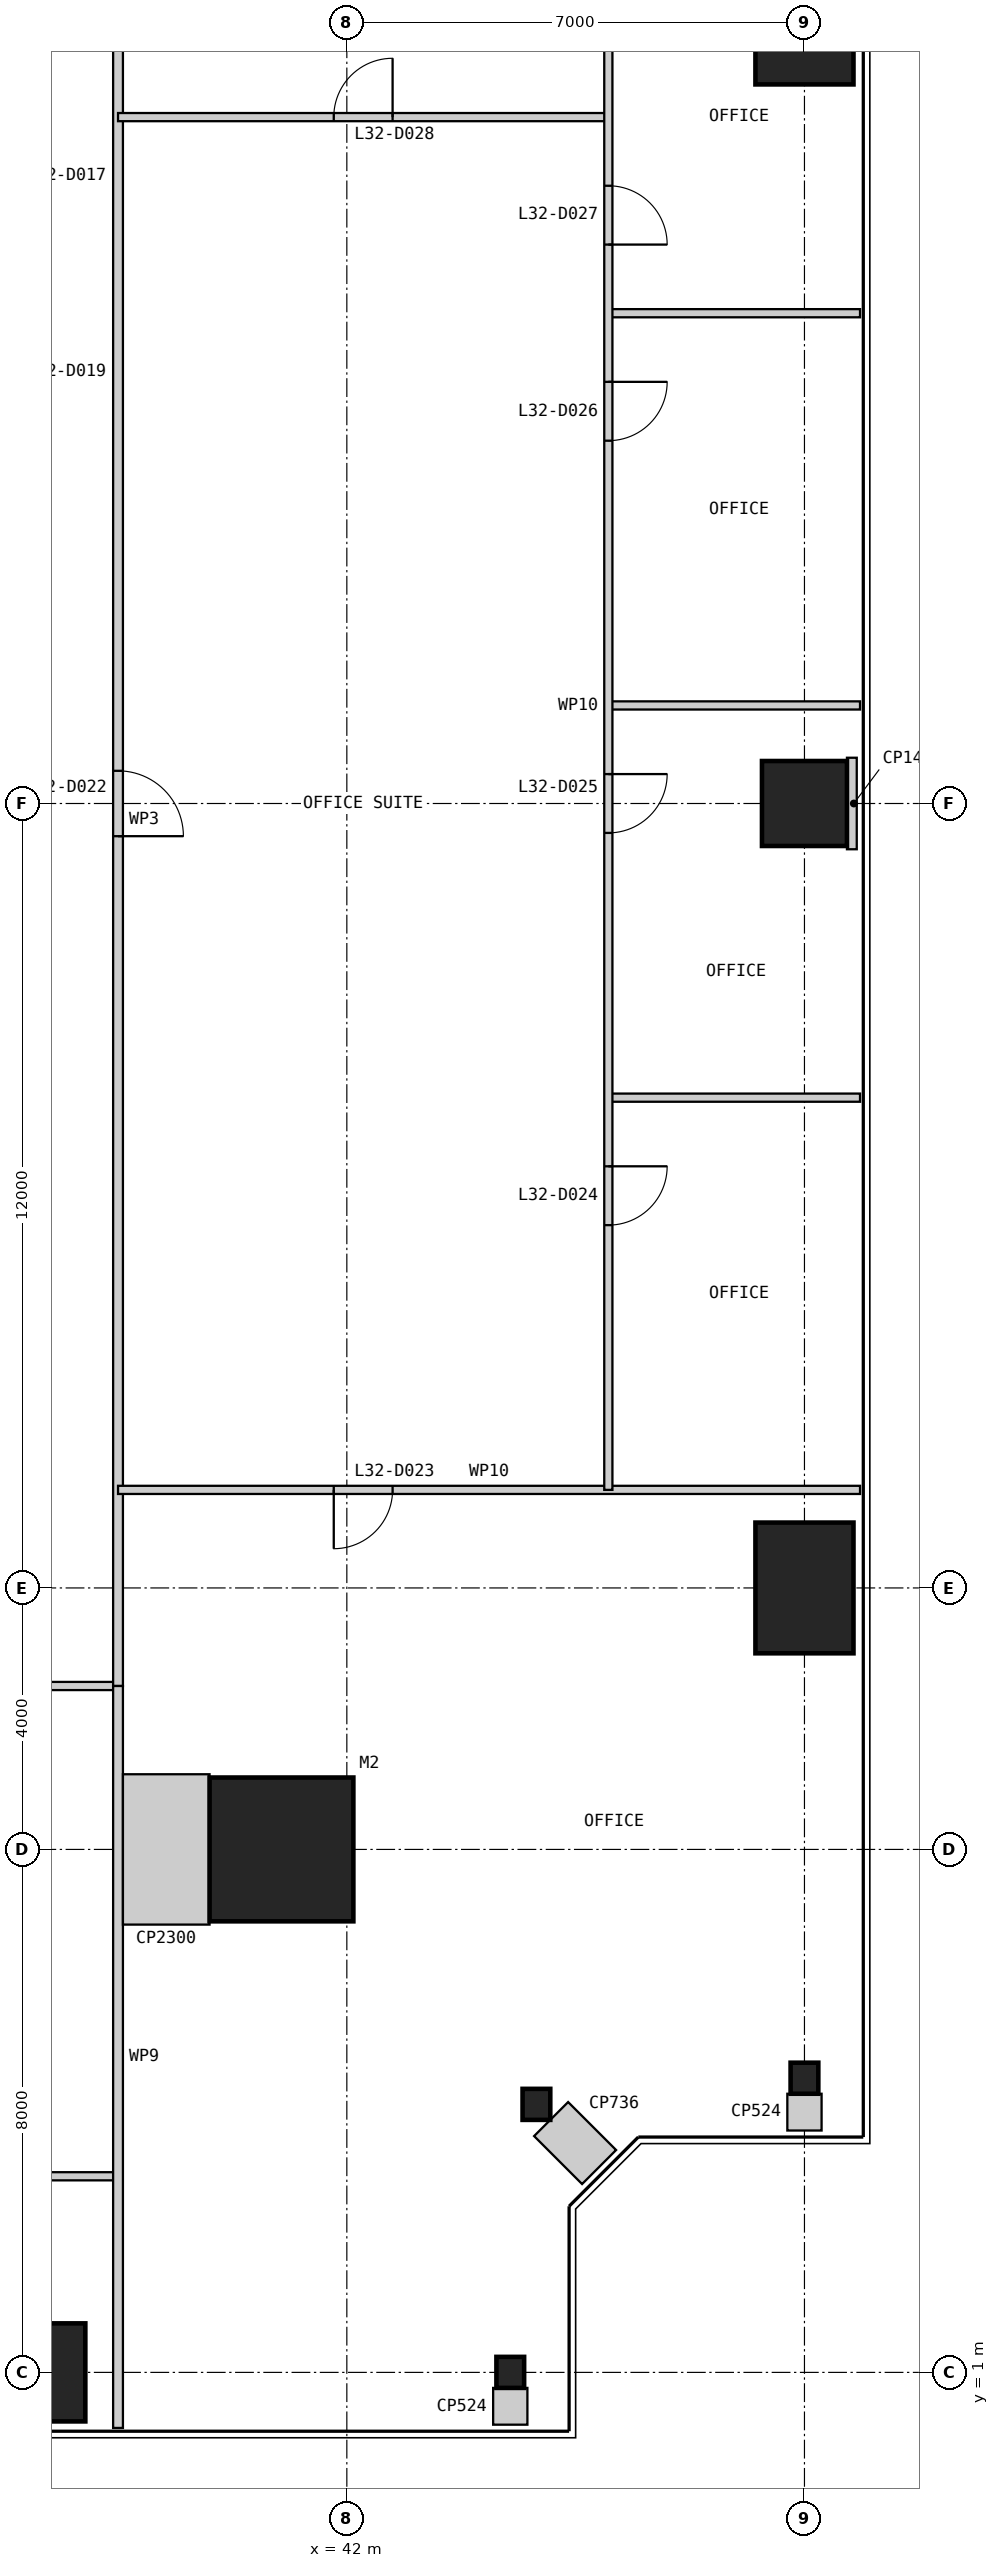
"""IFC4 building model, lengths in metres.
Left out: names, types, materials, properties, quantities, classifications, styles, units other than length and angle.
Written with IfcOpenShell. Run it as: python <this file> out.ifc"""

import sys

from ifc_helpers import new_model, si_unit, direction, frame, frame_2d, origin, origin_2d, place, context, subcontext, project, spatial, rectangle, i_section, extrude, element, fill, save


model = new_model("IFC4")
c1 = context("Model", 3, precision=1e-05, world=origin(), true_north=direction((0.0, 1.0)))
c2 = subcontext(c1, "Body", "Model", "MODEL_VIEW")
j1 = project(units=[si_unit("LENGTHUNIT", "METRE"), si_unit("PLANEANGLEUNIT", "RADIAN")], contexts=[c1])
p1 = place(None, origin())
s1 = spatial("IfcSite", under=j1, at=p1, CompositionType="ELEMENT")
p2 = place(p1, origin())
s2 = spatial("IfcBuilding", under=s1, at=p2, CompositionType="ELEMENT")
p3 = place(p2, frame((0.0, 0.0, 138.4)))
s3 = spatial("IfcBuildingStorey", under=s2, at=p3, CompositionType="ELEMENT", Elevation=138.4)
p4 = place(p3, frame((41.0, 9.0, 0.0), z_axis=(0.0, 0.0, 1.0), x_axis=(1.0, 0.0, 0.0)))
e1 = element("IfcColumn", 1, at=p4, inside=s3, PredefinedType="COLUMN", context=c2, shape_type="SweptSolid", body=[
    extrude(rectangle(XDim=2.2, YDim=2.2, at=origin_2d()), origin(), (0.0, 0.0, 1.0), 4.0),
])
p5 = place(p3, frame((37.0, 1.0, 0.0), z_axis=(0.0, 0.0, 1.0), x_axis=(1.0, 0.0, 0.0)))
e2 = element("IfcColumn", 2, at=p5, inside=s3, PredefinedType="COLUMN", context=c2, shape_type="SweptSolid", body=[
    extrude(rectangle(XDim=2.0, YDim=1.5, at=origin_2d()), origin(), (0.0, 0.0, 1.0), 4.0),
])
for number, where, z_axis, x_axis in (
    (3, (44.5, 1.0, 0.0), (0.0, 0.0, 1.0), (1.0, 0.0, 0.0)),
    (4, (44.9, 5.1, 0.0), (0.0, 0.0, 1.0), (1.0, 0.0, 0.0)),
    (5, (49.0, 5.5, 0.0), (0.0, 0.0, 1.0), (1.0, 0.0, 0.0)),
):
    element("IfcColumn", number, at=place(p3, frame(where, z_axis=z_axis, x_axis=x_axis)), inside=s3, PredefinedType="COLUMN", context=c2, shape_type="SweptSolid", body=[
        extrude(i_section(OverallWidth=0.424, OverallDepth=0.475, WebThickness=0.048, FlangeThickness=0.077, at=origin_2d()), origin(), (0.0, 0.0, 1.0), 4.0),
    ])
p6 = place(p3, frame((49.0, 13.0, 0.0), z_axis=(0.0, 0.0, 1.0), x_axis=(1.0, 0.0, 0.0)))
e6 = element("IfcColumn", 6, at=p6, inside=s3, PredefinedType="COLUMN", context=c2, shape_type="SweptSolid", body=[
    extrude(rectangle(XDim=1.5, YDim=2.0, at=origin_2d()), origin(), (0.0, 0.0, 1.0), 4.0),
])
p7 = place(p3, frame((49.0, 25.0, 0.0), z_axis=(0.0, 0.0, 1.0), x_axis=(1.0, 0.0, 0.0)))
e7 = element("IfcColumn", 7, at=p7, inside=s3, PredefinedType="COLUMN", context=c2, shape_type="SweptSolid", body=[
    extrude(rectangle(XDim=1.3, YDim=1.3, at=origin_2d()), origin(), (0.0, 0.0, 1.0), 4.0),
])
p8 = place(p3, frame((49.0, 37.0, 0.0), z_axis=(0.0, 0.0, 1.0), x_axis=(1.0, 0.0, 0.0)))
e8 = element("IfcColumn", 8, at=p8, inside=s3, PredefinedType="COLUMN", context=c2, shape_type="SweptSolid", body=[
    extrude(rectangle(XDim=1.5, YDim=2.0, at=origin_2d()), origin(), (0.0, 0.0, 1.0), 4.0),
])
p9 = place(p3, frame((32.5, 4.0, 0.0), z_axis=(0.0, 0.0, 1.0), x_axis=(1.0, 0.0, 0.0)))
e9 = element("IfcWall", 9, at=p9, inside=s3, PredefinedType="PARTITIONING", context=c2, shape_type="SweptSolid", body=[
    extrude(rectangle(XDim=6.0, YDim=0.125, at=frame_2d((3.0, 0.0))), origin(), (0.0, 0.0, 1.0), 3.85),
])
p10 = place(p3, frame((35.5, 11.5, 0.0), z_axis=(0.0, 0.0, 1.0), x_axis=(1.0, 0.0, 0.0)))
e10 = element("IfcWall", 10, at=p10, inside=s3, PredefinedType="PARTITIONING", context=c2, shape_type="SweptSolid", body=[
    extrude(rectangle(XDim=3.0, YDim=0.125, at=frame_2d((1.5, 0.0))), origin(), (0.0, 0.0, 1.0), 3.85),
])
p11 = place(p3, frame((38.5, 11.5, 0.0), z_axis=(0.0, 0.0, 1.0), x_axis=(0.0, 1.0, 0.0)))
e11 = element("IfcWall", 11, at=p11, inside=s3, PredefinedType="PARTITIONING", context=c2, shape_type="SweptSolid", body=[
    extrude(rectangle(XDim=27.0, YDim=0.15, at=frame_2d((13.5, 0.0))), origin(), (0.0, 0.0, 1.0), 3.85),
])
p12 = place(p11, frame((13.0, 0.0, 0.0)))
e12 = element("IfcOpeningElement", 12, at=p12, cuts=e11, PredefinedType="OPENING", context=c2, shape_type="SweptSolid", body=[
    extrude(rectangle(XDim=1.0, YDim=2.2, at=frame_2d((0.5, 1.1))), frame((0.0, 0.085, 0.0), z_axis=(0.0, -1.0, 0.0), x_axis=(1.0, 0.0, 0.0)), (0.0, 0.0, 1.0), 0.17),
])
p13 = place(p3, frame((38.5, 0.15, 0.0), z_axis=(0.0, 0.0, 1.0), x_axis=(0.0, 1.0, 0.0)))
e13 = element("IfcWall", 13, at=p13, inside=s3, PredefinedType="PARTITIONING", context=c2, shape_type="SweptSolid", body=[
    extrude(rectangle(XDim=11.35, YDim=0.15, at=frame_2d((5.675, 0.0))), origin(), (0.0, 0.0, 1.0), 3.85),
])
p14 = place(p3, frame((49.85, 14.5, 0.0), z_axis=(0.0, 0.0, 1.0), x_axis=(-1.0, 0.0, 0.0)))
e14 = element("IfcWall", 14, at=p14, inside=s3, PredefinedType="PARTITIONING", context=c2, shape_type="SweptSolid", body=[
    extrude(rectangle(XDim=11.35, YDim=0.125, at=frame_2d((5.675, 0.0))), origin(), (0.0, 0.0, 1.0), 3.85),
])
p15 = place(p14, frame((7.15, 0.0, 0.0)))
e15 = element("IfcOpeningElement", 15, at=p15, cuts=e14, PredefinedType="OPENING", context=c2, shape_type="SweptSolid", body=[
    extrude(rectangle(XDim=0.9, YDim=2.2, at=frame_2d((0.45, 1.1))), frame((0.0, 0.073, 0.0), z_axis=(0.0, -1.0, 0.0), x_axis=(1.0, 0.0, 0.0)), (0.0, 0.0, 1.0), 0.145),
])
for number, where, z_axis, x_axis in (
    (16, (49.85, 20.5, 0.0), (0.0, 0.0, 1.0), (-1.0, 0.0, 0.0)),
    (17, (49.85, 26.5, 0.0), (0.0, 0.0, 1.0), (-1.0, 0.0, 0.0)),
    (18, (49.85, 32.5, 0.0), (0.0, 0.0, 1.0), (-1.0, 0.0, 0.0)),
):
    element("IfcWall", number, at=place(p3, frame(where, z_axis=z_axis, x_axis=x_axis)), inside=s3, PredefinedType="PARTITIONING", context=c2, shape_type="SweptSolid", body=[
        extrude(rectangle(XDim=3.85, YDim=0.125, at=frame_2d((1.925, 0.0))), origin(), (0.0, 0.0, 1.0), 3.85),
    ])
p16 = place(p3, frame((46.0, 35.5, 0.0), z_axis=(0.0, 0.0, 1.0), x_axis=(-1.0, 0.0, 0.0)))
e19 = element("IfcWall", 19, at=p16, inside=s3, PredefinedType="PARTITIONING", context=c2, shape_type="SweptSolid", body=[
    extrude(rectangle(XDim=7.5, YDim=0.125, at=frame_2d((3.75, 0.0))), origin(), (0.0, 0.0, 1.0), 3.85),
])
p17 = place(p16, frame((3.3, 0.0, 0.0)))
e20 = element("IfcOpeningElement", 20, at=p17, cuts=e19, PredefinedType="OPENING", context=c2, shape_type="SweptSolid", body=[
    extrude(rectangle(XDim=0.9, YDim=2.2, at=frame_2d((0.45, 1.1))), frame((0.0, 0.073, 0.0), z_axis=(0.0, -1.0, 0.0), x_axis=(1.0, 0.0, 0.0)), (0.0, 0.0, 1.0), 0.145),
])
p18 = place(p3, frame((46.0, 14.5, 0.0), z_axis=(0.0, 0.0, 1.0), x_axis=(0.0, 1.0, 0.0)))
e21 = element("IfcWall", 21, at=p18, inside=s3, PredefinedType="PARTITIONING", context=c2, shape_type="SweptSolid", body=[
    extrude(rectangle(XDim=24.0, YDim=0.125, at=frame_2d((12.0, 0.0))), origin(), (0.0, 0.0, 1.0), 3.238),
])
p19 = place(p18, frame((4.05, 0.0, 0.0)))
e22 = element("IfcOpeningElement", 22, at=p19, cuts=e21, PredefinedType="OPENING", context=c2, shape_type="SweptSolid", body=[
    extrude(rectangle(XDim=0.9, YDim=2.2, at=frame_2d((0.45, 1.1))), frame((0.0, 0.073, 0.0), z_axis=(0.0, -1.0, 0.0), x_axis=(1.0, 0.0, 0.0)), (0.0, 0.0, 1.0), 0.145),
])
p20 = place(p18, frame((10.05, 0.0, 0.0)))
e23 = element("IfcOpeningElement", 23, at=p20, cuts=e21, PredefinedType="OPENING", context=c2, shape_type="SweptSolid", body=[
    extrude(rectangle(XDim=0.9, YDim=2.2, at=frame_2d((0.45, 1.1))), frame((0.0, 0.073, 0.0), z_axis=(0.0, -1.0, 0.0), x_axis=(1.0, 0.0, 0.0)), (0.0, 0.0, 1.0), 0.145),
])
p21 = place(p18, frame((16.05, 0.0, 0.0)))
e24 = element("IfcOpeningElement", 24, at=p21, cuts=e21, PredefinedType="OPENING", context=c2, shape_type="SweptSolid", body=[
    extrude(rectangle(XDim=0.9, YDim=2.2, at=frame_2d((0.45, 1.1))), frame((0.0, 0.073, 0.0), z_axis=(0.0, -1.0, 0.0), x_axis=(1.0, 0.0, 0.0)), (0.0, 0.0, 1.0), 0.145),
])
p22 = place(p18, frame((19.05, 0.0, 0.0)))
e25 = element("IfcOpeningElement", 25, at=p22, cuts=e21, PredefinedType="OPENING", context=c2, shape_type="SweptSolid", body=[
    extrude(rectangle(XDim=0.9, YDim=2.2, at=frame_2d((0.45, 1.1))), frame((0.0, 0.073, 0.0), z_axis=(0.0, -1.0, 0.0), x_axis=(1.0, 0.0, 0.0)), (0.0, 0.0, 1.0), 0.145),
])
p23 = place(p3, frame((38.575, 9.0, 0.0), z_axis=(0.0, 0.0, 1.0), x_axis=(1.0, 0.0, 0.0)))
e26 = element("IfcWall", 26, at=p23, inside=s3, PredefinedType="PARTITIONING", context=c2, shape_type="SweptSolid", body=[
    extrude(rectangle(XDim=1.325, YDim=2.3, at=frame_2d((0.663, 0.0))), origin(), (0.0, 0.0, 1.0), 3.85),
])
p24 = place(p3, frame((44.5, 0.2, 0.0), z_axis=(0.0, 0.0, 1.0), x_axis=(0.0, 1.0, 0.0)))
e27 = element("IfcWall", 27, at=p24, inside=s3, PredefinedType="PARTITIONING", context=c2, shape_type="SweptSolid", body=[
    extrude(rectangle(XDim=0.562, YDim=0.524, at=frame_2d((0.281, 0.0))), origin(), (0.0, 0.0, 1.0), 3.85),
])
p25 = place(p3, frame((45.859, 4.141, 0.0), z_axis=(0.0, 0.0, 1.0), x_axis=(-0.707106781187, 0.707106781187, 0.0)))
e28 = element("IfcWall", 28, at=p25, inside=s3, PredefinedType="PARTITIONING", context=c2, shape_type="SweptSolid", body=[
    extrude(rectangle(XDim=1.038, YDim=0.736, at=frame_2d((0.519, 0.0))), origin(), (0.0, 0.0, 1.0), 3.85),
])
p26 = place(p3, frame((49.0, 4.7, 0.0), z_axis=(0.0, 0.0, 1.0), x_axis=(0.0, 1.0, 0.0)))
e29 = element("IfcWall", 29, at=p26, inside=s3, PredefinedType="PARTITIONING", context=c2, shape_type="SweptSolid", body=[
    extrude(rectangle(XDim=0.562, YDim=0.524, at=frame_2d((0.281, 0.0))), origin(), (0.0, 0.0, 1.0), 3.85),
])
p27 = place(p3, frame((49.8, 25.0, 0.0), z_axis=(0.0, 0.0, 1.0), x_axis=(-1.0, 0.0, 0.0)))
e30 = element("IfcWall", 30, at=p27, inside=s3, PredefinedType="PARTITIONING", context=c2, shape_type="SweptSolid", body=[
    extrude(rectangle(XDim=0.15, YDim=1.4, at=frame_2d((0.075, 0.0))), origin(), (0.0, 0.0, 1.0), 3.85),
])
p28 = place(p12, frame((1.0, 0.0, 0.0), z_axis=(0.0, 0.0, 1.0), x_axis=(-1.0, 0.0, 0.0)))
e31 = element("IfcDoor", 31, at=p28, inside=s3, OperationType="SINGLE_SWING_RIGHT", PredefinedType="DOOR", context=c2, shape_type="SweptSolid", body=[
    extrude(rectangle(XDim=1.0, YDim=2.2, at=frame_2d((0.5, 1.1))), frame((0.0, 0.025, 0.0), z_axis=(0.0, -1.0, 0.0), x_axis=(1.0, 0.0, 0.0)), (0.0, 0.0, 1.0), 0.05),
])
fill(e12, e31)
p29 = place(p15, origin())
e32 = element("IfcDoor", 32, at=p29, inside=s3, OperationType="SINGLE_SWING_RIGHT", PredefinedType="DOOR", context=c2, shape_type="SweptSolid", body=[
    extrude(rectangle(XDim=0.9, YDim=2.2, at=frame_2d((0.45, 1.1))), frame((0.0, 0.025, 0.0), z_axis=(0.0, -1.0, 0.0), x_axis=(1.0, 0.0, 0.0)), (0.0, 0.0, 1.0), 0.05),
])
fill(e15, e32)
p30 = place(p19, frame((0.9, 0.0, 0.0), z_axis=(0.0, 0.0, 1.0), x_axis=(-1.0, 0.0, 0.0)))
e33 = element("IfcDoor", 33, at=p30, inside=s3, OperationType="SINGLE_SWING_LEFT", PredefinedType="DOOR", context=c2, shape_type="SweptSolid", body=[
    extrude(rectangle(XDim=0.9, YDim=2.2, at=frame_2d((0.45, 1.1))), frame((0.0, 0.025, 0.0), z_axis=(0.0, -1.0, 0.0), x_axis=(1.0, 0.0, 0.0)), (0.0, 0.0, 1.0), 0.05),
])
fill(e22, e33)
p31 = place(p20, frame((0.9, 0.0, 0.0), z_axis=(0.0, 0.0, 1.0), x_axis=(-1.0, 0.0, 0.0)))
e34 = element("IfcDoor", 34, at=p31, inside=s3, OperationType="SINGLE_SWING_LEFT", PredefinedType="DOOR", context=c2, shape_type="SweptSolid", body=[
    extrude(rectangle(XDim=0.9, YDim=2.2, at=frame_2d((0.45, 1.1))), frame((0.0, 0.025, 0.0), z_axis=(0.0, -1.0, 0.0), x_axis=(1.0, 0.0, 0.0)), (0.0, 0.0, 1.0), 0.05),
])
fill(e23, e34)
p32 = place(p21, frame((0.9, 0.0, 0.0), z_axis=(0.0, 0.0, 1.0), x_axis=(-1.0, 0.0, 0.0)))
e35 = element("IfcDoor", 35, at=p32, inside=s3, OperationType="SINGLE_SWING_LEFT", PredefinedType="DOOR", context=c2, shape_type="SweptSolid", body=[
    extrude(rectangle(XDim=0.9, YDim=2.2, at=frame_2d((0.45, 1.1))), frame((0.0, 0.025, 0.0), z_axis=(0.0, -1.0, 0.0), x_axis=(1.0, 0.0, 0.0)), (0.0, 0.0, 1.0), 0.05),
])
fill(e24, e35)
p33 = place(p22, frame((0.9, 0.0, 0.0), z_axis=(0.0, 0.0, 1.0), x_axis=(-1.0, 0.0, 0.0)))
e36 = element("IfcDoor", 36, at=p33, inside=s3, OperationType="SINGLE_SWING_RIGHT", PredefinedType="DOOR", context=c2, shape_type="SweptSolid", body=[
    extrude(rectangle(XDim=0.9, YDim=2.2, at=frame_2d((0.45, 1.1))), frame((0.0, 0.025, 0.0), z_axis=(0.0, -1.0, 0.0), x_axis=(1.0, 0.0, 0.0)), (0.0, 0.0, 1.0), 0.05),
])
fill(e25, e36)
p34 = place(p17, frame((0.9, 0.0, 0.0), z_axis=(0.0, 0.0, 1.0), x_axis=(-1.0, 0.0, 0.0)))
e37 = element("IfcDoor", 37, at=p34, inside=s3, OperationType="SINGLE_SWING_RIGHT", PredefinedType="DOOR", context=c2, shape_type="SweptSolid", body=[
    extrude(rectangle(XDim=0.9, YDim=2.2, at=frame_2d((0.45, 1.1))), frame((0.0, 0.025, 0.0), z_axis=(0.0, -1.0, 0.0), x_axis=(1.0, 0.0, 0.0)), (0.0, 0.0, 1.0), 0.05),
])
fill(e20, e37)
save(model, sys.argv[1])
